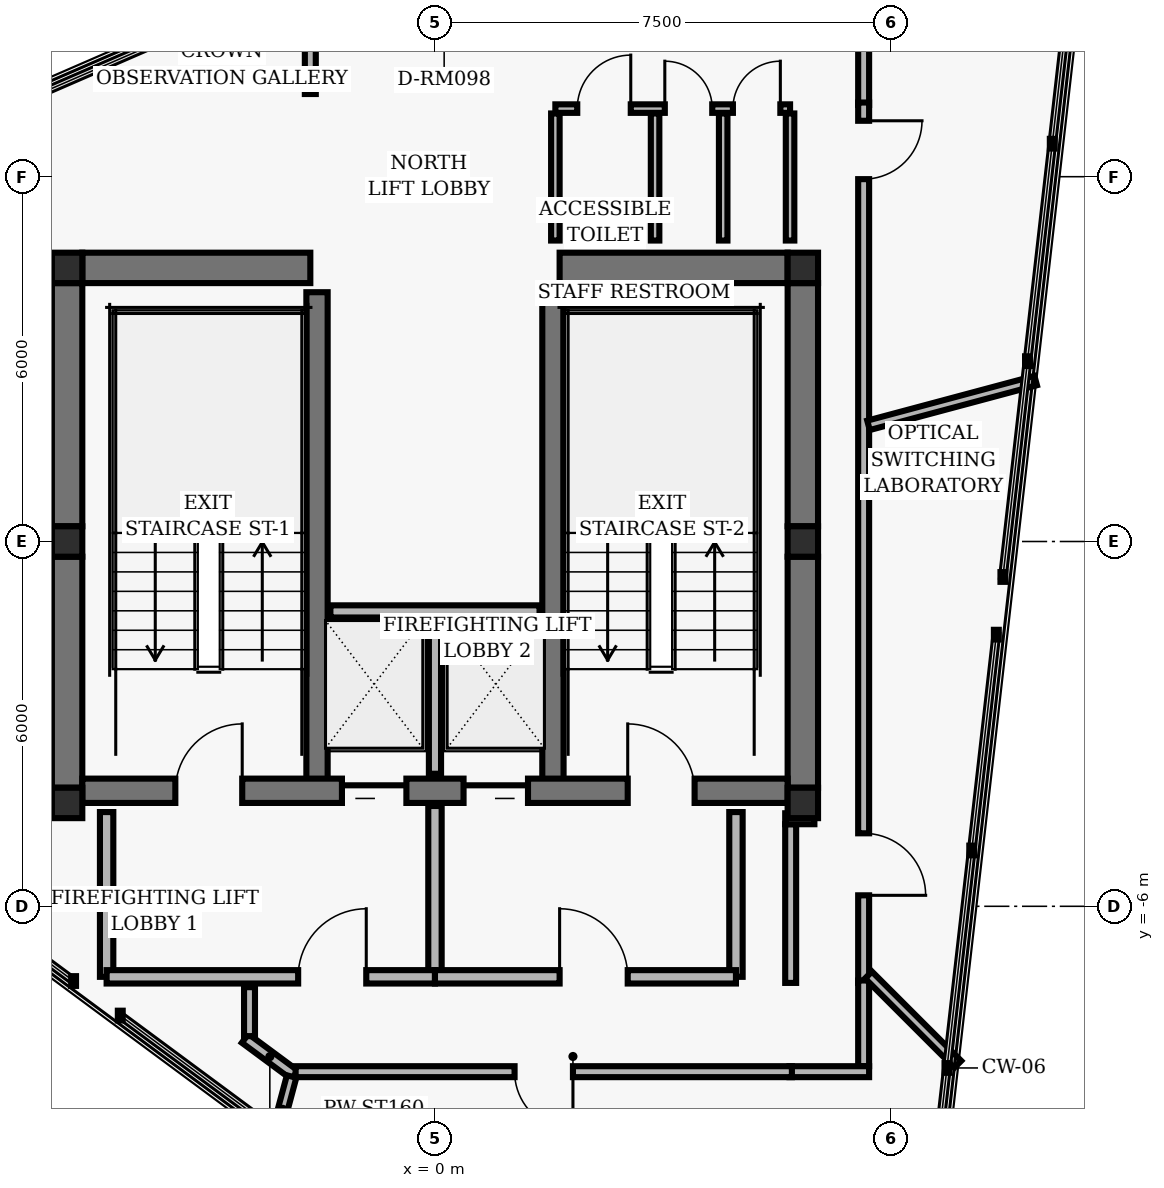
"""IFC4 building model, lengths in metres.
Left out: names, types, materials, properties, quantities, classifications, styles, units other than length and angle.
Written with IfcOpenShell. Run it as: python <this file> out.ifc"""

import sys

from ifc_helpers import new_model, si_unit, direction, frame, frame_2d, origin, origin_2d, place, context, subcontext, project, spatial, rectangle, hollow_rectangle, extrude, element, fill, save


model = new_model("IFC4")
c1 = context("Model", 3, precision=1e-05, world=origin(), true_north=direction((0.0, 1.0)))
c2 = subcontext(c1, "Body", "Model", "MODEL_VIEW")
j1 = project(units=[si_unit("LENGTHUNIT", "METRE"), si_unit("PLANEANGLEUNIT", "RADIAN")], contexts=[c1])
p1 = place(None, origin())
s1 = spatial("IfcSite", under=j1, at=p1, CompositionType="ELEMENT")
p2 = place(p1, origin())
s2 = spatial("IfcBuilding", under=s1, at=p2, CompositionType="ELEMENT")
p3 = place(p2, frame((0.0, 0.0, 246.24)))
s3 = spatial("IfcBuildingStorey", under=s2, at=p3, CompositionType="ELEMENT", Elevation=246.24)
for number, where, z_axis, x_axis in (
    (1, (-6.05, 4.5, 0.0), (0.0, 0.0, 1.0), (1.0, 0.0, 0.0)),
    (2, (6.05, 4.5, 0.0), (0.0, 0.0, 1.0), (1.0, 0.0, 0.0)),
    (3, (-6.05, 0.0, 0.0), (0.0, 0.0, 1.0), (1.0, 0.0, 0.0)),
    (4, (6.05, 0.0, 0.0), (0.0, 0.0, 1.0), (1.0, 0.0, 0.0)),
    (5, (-6.05, -4.3, 0.0), (0.0, 0.0, 1.0), (1.0, 0.0, 0.0)),
    (6, (6.05, -4.3, 0.0), (0.0, 0.0, 1.0), (1.0, 0.0, 0.0)),
):
    element("IfcColumn", number, at=place(p3, frame(where, z_axis=z_axis, x_axis=x_axis)), inside=s3, PredefinedType="COLUMN", context=c2, shape_type="SweptSolid", body=[
        extrude(hollow_rectangle(XDim=0.5, YDim=0.5, WallThickness=0.02, InnerFilletRadius=0.02, OuterFilletRadius=0.04, at=origin_2d()), origin(), (0.0, 0.0, 1.0), 2.88),
    ])
p4 = place(p3, frame((-6.05, 0.25, 0.0), z_axis=(0.0, 0.0, 1.0), x_axis=(0.0, 1.0, 0.0)))
e7 = element("IfcWall", 7, at=p4, inside=s3, PredefinedType="SHEAR", context=c2, shape_type="SweptSolid", body=[
    extrude(rectangle(XDim=4.0, YDim=0.5, at=frame_2d((2.0, 0.0))), origin(), (0.0, 0.0, 1.0), 2.648),
])
p5 = place(p3, frame((-6.05, -4.05, 0.0), z_axis=(0.0, 0.0, 1.0), x_axis=(0.0, 1.0, 0.0)))
e8 = element("IfcWall", 8, at=p5, inside=s3, PredefinedType="SHEAR", context=c2, shape_type="SweptSolid", body=[
    extrude(rectangle(XDim=3.8, YDim=0.5, at=frame_2d((1.9, 0.0))), origin(), (0.0, 0.0, 1.0), 2.648),
])
p6 = place(p3, frame((6.05, 0.25, 0.0), z_axis=(0.0, 0.0, 1.0), x_axis=(0.0, 1.0, 0.0)))
e9 = element("IfcWall", 9, at=p6, inside=s3, PredefinedType="SHEAR", context=c2, shape_type="SweptSolid", body=[
    extrude(rectangle(XDim=4.0, YDim=0.5, at=frame_2d((2.0, 0.0))), origin(), (0.0, 0.0, 1.0), 2.648),
])
p7 = place(p3, frame((6.05, -4.05, 0.0), z_axis=(0.0, 0.0, 1.0), x_axis=(0.0, 1.0, 0.0)))
e10 = element("IfcWall", 10, at=p7, inside=s3, PredefinedType="SHEAR", context=c2, shape_type="SweptSolid", body=[
    extrude(rectangle(XDim=3.8, YDim=0.5, at=frame_2d((1.9, 0.0))), origin(), (0.0, 0.0, 1.0), 2.648),
])
for number, where, z_axis, x_axis in (
    (11, (-1.94, -4.1, 0.0), (0.0, 0.0, 1.0), (0.0, 1.0, 0.0)),
    (12, (1.94, -4.1, 0.0), (0.0, 0.0, 1.0), (0.0, 1.0, 0.0)),
):
    element("IfcWall", number, at=place(p3, frame(where, z_axis=z_axis, x_axis=x_axis)), inside=s3, PredefinedType="SHEAR", context=c2, shape_type="SweptSolid", body=[
        extrude(rectangle(XDim=8.2, YDim=0.35, at=frame_2d((4.1, 0.0))), origin(), (0.0, 0.0, 1.0), 2.648),
    ])
p8 = place(p3, frame((-5.8, -4.1, 0.0), z_axis=(0.0, 0.0, 1.0), x_axis=(1.0, 0.0, 0.0)))
e13 = element("IfcWall", 13, at=p8, inside=s3, PredefinedType="SHEAR", context=c2, shape_type="SweptSolid", body=[
    extrude(rectangle(XDim=11.6, YDim=0.4, at=frame_2d((5.8, 0.0))), origin(), (0.0, 0.0, 1.0), 2.648),
])
p9 = place(p8, frame((1.53, 0.0, 0.0)))
e14 = element("IfcOpeningElement", 14, at=p9, cuts=e13, PredefinedType="OPENING", context=c2, shape_type="SweptSolid", body=[
    extrude(rectangle(XDim=1.1, YDim=2.04, at=frame_2d((0.55, 1.02))), frame((0.0, 0.21, 0.0), z_axis=(0.0, -1.0, 0.0), x_axis=(1.0, 0.0, 0.0)), (0.0, 0.0, 1.0), 0.42),
])
p10 = place(p8, frame((8.97, 0.0, 0.0)))
e15 = element("IfcOpeningElement", 15, at=p10, cuts=e13, PredefinedType="OPENING", context=c2, shape_type="SweptSolid", body=[
    extrude(rectangle(XDim=1.1, YDim=2.04, at=frame_2d((0.55, 1.02))), frame((0.0, 0.21, 0.0), z_axis=(0.0, -1.0, 0.0), x_axis=(1.0, 0.0, 0.0)), (0.0, 0.0, 1.0), 0.42),
])
p11 = place(p8, frame((4.27, 0.0, 0.0)))
e16 = element("IfcOpeningElement", 16, at=p11, cuts=e13, PredefinedType="OPENING", context=c2, shape_type="SweptSolid", body=[
    extrude(rectangle(XDim=1.06, YDim=2.04, at=frame_2d((0.53, 1.02))), frame((0.0, 0.21, 0.0), z_axis=(0.0, -1.0, 0.0), x_axis=(1.0, 0.0, 0.0)), (0.0, 0.0, 1.0), 0.42),
])
p12 = place(p8, frame((6.27, 0.0, 0.0)))
e17 = element("IfcOpeningElement", 17, at=p12, cuts=e13, PredefinedType="OPENING", context=c2, shape_type="SweptSolid", body=[
    extrude(rectangle(XDim=1.06, YDim=2.04, at=frame_2d((0.53, 1.02))), frame((0.0, 0.21, 0.0), z_axis=(0.0, -1.0, 0.0), x_axis=(1.0, 0.0, 0.0)), (0.0, 0.0, 1.0), 0.42),
])
for number, where, z_axis, x_axis in (
    (18, (-5.8, 4.5, 0.0), (0.0, 0.0, 1.0), (1.0, 0.0, 0.0)),
    (19, (2.05, 4.5, 0.0), (0.0, 0.0, 1.0), (1.0, 0.0, 0.0)),
):
    element("IfcWall", number, at=place(p3, frame(where, z_axis=z_axis, x_axis=x_axis)), inside=s3, PredefinedType="SHEAR", context=c2, shape_type="SweptSolid", body=[
        extrude(rectangle(XDim=3.75, YDim=0.5, at=frame_2d((1.875, 0.0))), origin(), (0.0, 0.0, 1.0), 2.648),
    ])
p13 = place(p3, frame((0.0, -3.82, 0.0), z_axis=(0.0, 0.0, 1.0), x_axis=(0.0, 1.0, 0.0)))
e20 = element("IfcWall", 20, at=p13, inside=s3, PredefinedType="PARTITIONING", context=c2, shape_type="SweptSolid", body=[
    extrude(rectangle(XDim=2.67, YDim=0.2, at=frame_2d((1.335, 0.0))), origin(), (0.0, 0.0, 1.0), 2.623),
])
p14 = place(p3, frame((-1.72, -1.15, 0.0), z_axis=(0.0, 0.0, 1.0), x_axis=(1.0, 0.0, 0.0)))
e21 = element("IfcWall", 21, at=p14, inside=s3, PredefinedType="PARTITIONING", context=c2, shape_type="SweptSolid", body=[
    extrude(rectangle(XDim=3.44, YDim=0.2, at=frame_2d((1.72, 0.0))), origin(), (0.0, 0.0, 1.0), 2.623),
])
for number, where, z_axis, x_axis in (
    (22, (-5.4, -7.16, 0.0), (0.0, 0.0, 1.0), (0.0, 1.0, 0.0)),
    (23, (4.95, -7.16, 0.0), (0.0, 0.0, 1.0), (0.0, 1.0, 0.0)),
):
    element("IfcWall", number, at=place(p3, frame(where, z_axis=z_axis, x_axis=x_axis)), inside=s3, PredefinedType="PARTITIONING", context=c2, shape_type="SweptSolid", body=[
        extrude(rectangle(XDim=2.71, YDim=0.22, at=frame_2d((1.355, 0.0))), origin(), (0.0, 0.0, 1.0), 2.623),
    ])
p15 = place(p3, frame((0.0, -7.16, 0.0), z_axis=(0.0, 0.0, 1.0), x_axis=(0.0, 1.0, 0.0)))
e24 = element("IfcWall", 24, at=p15, inside=s3, PredefinedType="PARTITIONING", context=c2, shape_type="SweptSolid", body=[
    extrude(rectangle(XDim=2.81, YDim=0.22, at=frame_2d((1.405, 0.0))), origin(), (0.0, 0.0, 1.0), 2.623),
])
p16 = place(p3, frame((-5.4, -7.16, 0.0), z_axis=(0.0, 0.0, 1.0), x_axis=(1.0, 0.0, 0.0)))
e25 = element("IfcWall", 25, at=p16, inside=s3, PredefinedType="PARTITIONING", context=c2, shape_type="SweptSolid", body=[
    extrude(rectangle(XDim=5.4, YDim=0.22, at=frame_2d((2.7, 0.0))), origin(), (0.0, 0.0, 1.0), 2.623),
])
p17 = place(p16, frame((3.15, 0.0, 0.0)))
e26 = element("IfcOpeningElement", 26, at=p17, cuts=e25, PredefinedType="OPENING", context=c2, shape_type="SweptSolid", body=[
    extrude(rectangle(XDim=1.12, YDim=2.02, at=frame_2d((0.56, 1.01))), frame((0.0, 0.12, 0.0), z_axis=(0.0, -1.0, 0.0), x_axis=(1.0, 0.0, 0.0)), (0.0, 0.0, 1.0), 0.24),
])
p18 = place(p3, frame((0.0, -7.16, 0.0), z_axis=(0.0, 0.0, 1.0), x_axis=(1.0, 0.0, 0.0)))
e27 = element("IfcWall", 27, at=p18, inside=s3, PredefinedType="PARTITIONING", context=c2, shape_type="SweptSolid", body=[
    extrude(rectangle(XDim=4.95, YDim=0.22, at=frame_2d((2.475, 0.0))), origin(), (0.0, 0.0, 1.0), 2.623),
])
p19 = place(p18, frame((2.05, 0.0, 0.0)))
e28 = element("IfcOpeningElement", 28, at=p19, cuts=e27, PredefinedType="OPENING", context=c2, shape_type="SweptSolid", body=[
    extrude(rectangle(XDim=1.12, YDim=2.02, at=frame_2d((0.56, 1.01))), frame((0.0, 0.12, 0.0), z_axis=(0.0, -1.0, 0.0), x_axis=(1.0, 0.0, 0.0)), (0.0, 0.0, 1.0), 0.24),
])
p20 = place(p3, frame((1.98, 4.95, 0.0), z_axis=(0.0, 0.0, 1.0), x_axis=(0.0, 1.0, 0.0)))
e29 = element("IfcWall", 29, at=p20, inside=s3, PredefinedType="PARTITIONING", context=c2, shape_type="SweptSolid", body=[
    extrude(rectangle(XDim=2.09, YDim=0.14, at=frame_2d((1.045, 0.0))), origin(), (0.0, 0.0, 1.0), 2.623),
])
p21 = place(p3, frame((5.84, 4.95, 0.0), z_axis=(0.0, 0.0, 1.0), x_axis=(0.0, 1.0, 0.0)))
e30 = element("IfcWall", 30, at=p21, inside=s3, PredefinedType="PARTITIONING", context=c2, shape_type="SweptSolid", body=[
    extrude(rectangle(XDim=2.09, YDim=0.14, at=frame_2d((1.045, 0.0))), origin(), (0.0, 0.0, 1.0), 2.153),
])
p22 = place(p3, frame((1.98, 7.12, 0.0), z_axis=(0.0, 0.0, 1.0), x_axis=(1.0, 0.0, 0.0)))
e31 = element("IfcWall", 31, at=p22, inside=s3, PredefinedType="PARTITIONING", context=c2, shape_type="SweptSolid", body=[
    extrude(rectangle(XDim=3.86, YDim=0.14, at=frame_2d((1.93, 0.0))), origin(), (0.0, 0.0, 1.0), 2.623),
])
p23 = place(p22, frame((0.36, 0.0, 0.0)))
e32 = element("IfcOpeningElement", 32, at=p23, cuts=e31, PredefinedType="OPENING", context=c2, shape_type="SweptSolid", body=[
    extrude(rectangle(XDim=0.88, YDim=2.02, at=frame_2d((0.44, 1.01))), frame((0.0, 0.08, 0.0), z_axis=(0.0, -1.0, 0.0), x_axis=(1.0, 0.0, 0.0)), (0.0, 0.0, 1.0), 0.16),
])
p24 = place(p22, frame((1.8, 0.0, 0.0)))
e33 = element("IfcOpeningElement", 33, at=p24, cuts=e31, PredefinedType="OPENING", context=c2, shape_type="SweptSolid", body=[
    extrude(rectangle(XDim=0.78, YDim=2.01, at=frame_2d((0.39, 1.005))), frame((0.0, 0.08, 0.0), z_axis=(0.0, -1.0, 0.0), x_axis=(1.0, 0.0, 0.0)), (0.0, 0.0, 1.0), 0.16),
])
p25 = place(p22, frame((2.92, 0.0, 0.0)))
e34 = element("IfcOpeningElement", 34, at=p25, cuts=e31, PredefinedType="OPENING", context=c2, shape_type="SweptSolid", body=[
    extrude(rectangle(XDim=0.78, YDim=2.01, at=frame_2d((0.39, 1.005))), frame((0.0, 0.08, 0.0), z_axis=(0.0, -1.0, 0.0), x_axis=(1.0, 0.0, 0.0)), (0.0, 0.0, 1.0), 0.16),
])
for number, where, z_axis, x_axis in (
    (35, (3.62, 4.95, 0.0), (0.0, 0.0, 1.0), (0.0, 1.0, 0.0)),
    (36, (4.74, 4.95, 0.0), (0.0, 0.0, 1.0), (0.0, 1.0, 0.0)),
):
    element("IfcWall", number, at=place(p3, frame(where, z_axis=z_axis, x_axis=x_axis)), inside=s3, PredefinedType="PARTITIONING", context=c2, shape_type="SweptSolid", body=[
        extrude(rectangle(XDim=2.09, YDim=0.14, at=frame_2d((1.045, 0.0))), origin(), (0.0, 0.0, 1.0), 2.623),
    ])
p26 = place(p3, frame((-2.309, -8.773, 0.0), z_axis=(0.0, 0.0, 1.0), x_axis=(-0.803864984235, 0.594811808155, 0.0)))
e37 = element("IfcWall", 37, at=p26, inside=s3, PredefinedType="PARTITIONING", context=c2, shape_type="SweptSolid", body=[
    extrude(rectangle(XDim=1.011, YDim=0.18, at=frame_2d((0.506, 0.0))), origin(), (0.0, 0.0, 1.0), 2.203),
])
p27 = place(p3, frame((-3.05, -8.135, 0.0), z_axis=(0.0, 0.0, 1.0), x_axis=(0.0, 1.0, 0.0)))
e38 = element("IfcWall", 38, at=p27, inside=s3, PredefinedType="PARTITIONING", context=c2, shape_type="SweptSolid", body=[
    extrude(rectangle(XDim=0.805, YDim=0.18, at=frame_2d((0.403, 0.0))), origin(), (0.0, 0.0, 1.0), 2.623),
])
p28 = place(p3, frame((5.85, -7.26, 0.0), z_axis=(0.0, 0.0, 1.0), x_axis=(0.0, 1.0, 0.0)))
e39 = element("IfcWall", 39, at=p28, inside=s3, PredefinedType="PARTITIONING", context=c2, shape_type="SweptSolid", body=[
    extrude(rectangle(XDim=2.61, YDim=0.18, at=frame_2d((1.305, 0.0))), origin(), (0.0, 0.0, 1.0), 2.153),
])
p29 = place(p3, frame((5.76, -4.56, 0.0), z_axis=(0.0, 0.0, 1.0), x_axis=(1.0, 0.0, 0.0)))
e40 = element("IfcWall", 40, at=p29, inside=s3, PredefinedType="PARTITIONING", context=c2, shape_type="SweptSolid", body=[
    extrude(rectangle(XDim=0.48, YDim=0.18, at=frame_2d((0.24, 0.0))), origin(), (0.0, 0.0, 1.0), 2.623),
])
p30 = place(p3, frame((-2.05, 7.36, 0.0), z_axis=(0.0, 0.0, 1.0), x_axis=(0.0, 1.0, 0.0)))
e41 = element("IfcWall", 41, at=p30, inside=s3, PredefinedType="PARTITIONING", context=c2, shape_type="SweptSolid", body=[
    extrude(rectangle(XDim=0.847, YDim=0.18, at=frame_2d((0.423, 0.0))), origin(), (0.0, 0.0, 1.0), 2.623),
])
p31 = place(p3, frame((7.05, 8.53, 0.0), z_axis=(0.0, 0.0, 1.0), x_axis=(0.0, -1.0, 0.0)))
e42 = element("IfcWall", 42, at=p31, inside=s3, PredefinedType="PARTITIONING", context=c2, shape_type="SweptSolid", body=[
    extrude(rectangle(XDim=1.35, YDim=0.18, at=frame_2d((0.675, 0.0))), origin(), (0.0, 0.0, 1.0), 2.623),
])
p32 = place(p3, frame((7.05, 7.22, 0.0), z_axis=(0.0, 0.0, 1.0), x_axis=(0.0, -1.0, 0.0)))
e43 = element("IfcWall", 43, at=p32, inside=s3, PredefinedType="PARTITIONING", context=c2, shape_type="SweptSolid", body=[
    extrude(rectangle(XDim=14.48, YDim=0.18, at=frame_2d((7.24, 0.0))), origin(), (0.0, 0.0, 1.0), 2.203),
])
p33 = place(p32, frame((12.019, 0.0, 0.0)))
e44 = element("IfcOpeningElement", 44, at=p33, cuts=e43, PredefinedType="OPENING", context=c2, shape_type="SweptSolid", body=[
    extrude(rectangle(XDim=1.02, YDim=2.02, at=frame_2d((0.51, 1.01))), frame((0.0, 0.1, 0.0), z_axis=(0.0, -1.0, 0.0), x_axis=(1.0, 0.0, 0.0)), (0.0, 0.0, 1.0), 0.2),
])
p34 = place(p32, frame((0.3, 0.0, 0.0)))
e45 = element("IfcOpeningElement", 45, at=p34, cuts=e43, PredefinedType="OPENING", context=c2, shape_type="SweptSolid", body=[
    extrude(rectangle(XDim=0.96, YDim=2.02, at=frame_2d((0.48, 1.01))), frame((0.0, 0.1, 0.0), z_axis=(0.0, -1.0, 0.0), x_axis=(1.0, 0.0, 0.0)), (0.0, 0.0, 1.0), 0.2),
])
p35 = place(p3, frame((7.05, -7.22, 0.0), z_axis=(0.0, 0.0, 1.0), x_axis=(0.0, -1.0, 0.0)))
e46 = element("IfcWall", 46, at=p35, inside=s3, PredefinedType="PARTITIONING", context=c2, shape_type="SweptSolid", body=[
    extrude(rectangle(XDim=1.41, YDim=0.18, at=frame_2d((0.705, 0.0))), origin(), (0.0, 0.0, 1.0), 2.153),
])
p36 = place(p3, frame((7.14, -8.72, 0.0), z_axis=(0.0, 0.0, 1.0), x_axis=(-1.0, 0.0, 0.0)))
e47 = element("IfcWall", 47, at=p36, inside=s3, PredefinedType="PARTITIONING", context=c2, shape_type="SweptSolid", body=[
    extrude(rectangle(XDim=1.31, YDim=0.18, at=frame_2d((0.655, 0.0))), origin(), (0.0, 0.0, 1.0), 2.623),
])
p37 = place(p3, frame((5.87, -8.72, 0.0), z_axis=(0.0, 0.0, 1.0), x_axis=(-1.0, 0.0, 0.0)))
e48 = element("IfcWall", 48, at=p37, inside=s3, PredefinedType="PARTITIONING", context=c2, shape_type="SweptSolid", body=[
    extrude(rectangle(XDim=8.162, YDim=0.18, at=frame_2d((4.081, 0.0))), origin(), (0.0, 0.0, 1.0), 2.623),
])
p38 = place(p37, frame((3.601, 0.0, 0.0)))
e49 = element("IfcOpeningElement", 49, at=p38, cuts=e48, PredefinedType="OPENING", context=c2, shape_type="SweptSolid", body=[
    extrude(rectangle(XDim=0.96, YDim=2.02, at=frame_2d((0.48, 1.01))), frame((0.0, 0.1, 0.0), z_axis=(0.0, -1.0, 0.0), x_axis=(1.0, 0.0, 0.0)), (0.0, 0.0, 1.0), 0.2),
])
p39 = place(p3, frame((-2.358, -8.8, 0.0), z_axis=(0.0, 0.0, 1.0), x_axis=(-0.258899893442, -0.965904159415, 0.0)))
e50 = element("IfcWall", 50, at=p39, inside=s3, PredefinedType="PARTITIONING", context=c2, shape_type="SweptSolid", body=[
    extrude(rectangle(XDim=1.117, YDim=0.16, at=frame_2d((0.559, 0.0))), origin(), (0.0, 0.0, 1.0), 2.623),
])
p40 = place(p3, frame((7.13, -7.13, 0.0), z_axis=(0.0, 0.0, 1.0), x_axis=(0.707106781187, -0.707106781187, 0.0)))
e51 = element("IfcWall", 51, at=p40, inside=s3, PredefinedType="PARTITIONING", context=c2, shape_type="SweptSolid", body=[
    extrude(rectangle(XDim=2.076, YDim=0.16, at=frame_2d((1.038, 0.0))), origin(), (0.0, 0.0, 1.0), 2.623),
])
p41 = place(p3, frame((7.13, 1.91, 0.0), z_axis=(0.0, 0.0, 1.0), x_axis=(0.965918188347, 0.258847548609, 0.0)))
e52 = element("IfcWall", 52, at=p41, inside=s3, PredefinedType="PARTITIONING", context=c2, shape_type="SweptSolid", body=[
    extrude(rectangle(XDim=2.846, YDim=0.16, at=frame_2d((1.423, 0.0))), origin(), (0.0, 0.0, 1.0), 2.623),
])
p42 = place(p9, origin())
e53 = element("IfcDoor", 53, at=p42, inside=s3, OperationType="SINGLE_SWING_RIGHT", PredefinedType="DOOR", context=c2, shape_type="SweptSolid", body=[
    extrude(rectangle(XDim=1.1, YDim=2.04, at=frame_2d((0.55, 1.02))), frame((0.0, 0.025, 0.0), z_axis=(0.0, -1.0, 0.0), x_axis=(1.0, 0.0, 0.0)), (0.0, 0.0, 1.0), 0.05),
])
fill(e14, e53)
p43 = place(p10, origin())
e54 = element("IfcDoor", 54, at=p43, inside=s3, OperationType="SINGLE_SWING_LEFT", PredefinedType="DOOR", context=c2, shape_type="SweptSolid", body=[
    extrude(rectangle(XDim=1.1, YDim=2.04, at=frame_2d((0.55, 1.02))), frame((0.0, 0.025, 0.0), z_axis=(0.0, -1.0, 0.0), x_axis=(1.0, 0.0, 0.0)), (0.0, 0.0, 1.0), 0.05),
])
fill(e15, e54)
p44 = place(p11, origin())
e55 = element("IfcDoor", 55, at=p44, inside=s3, OperationType="SLIDING_TO_LEFT", PredefinedType="DOOR", context=c2, shape_type="SweptSolid", body=[
    extrude(rectangle(XDim=1.06, YDim=2.04, at=frame_2d((0.53, 1.02))), frame((0.0, 0.025, 0.0), z_axis=(0.0, -1.0, 0.0), x_axis=(1.0, 0.0, 0.0)), (0.0, 0.0, 1.0), 0.05),
])
fill(e16, e55)
p45 = place(p12, origin())
e56 = element("IfcDoor", 56, at=p45, inside=s3, OperationType="SLIDING_TO_RIGHT", PredefinedType="DOOR", context=c2, shape_type="SweptSolid", body=[
    extrude(rectangle(XDim=1.06, YDim=2.04, at=frame_2d((0.53, 1.02))), frame((0.0, 0.025, 0.0), z_axis=(0.0, -1.0, 0.0), x_axis=(1.0, 0.0, 0.0)), (0.0, 0.0, 1.0), 0.05),
])
fill(e17, e56)
p46 = place(p17, origin())
e57 = element("IfcDoor", 57, at=p46, inside=s3, OperationType="SINGLE_SWING_RIGHT", PredefinedType="DOOR", context=c2, shape_type="SweptSolid", body=[
    extrude(rectangle(XDim=1.12, YDim=2.02, at=frame_2d((0.56, 1.01))), frame((0.0, 0.025, 0.0), z_axis=(0.0, -1.0, 0.0), x_axis=(1.0, 0.0, 0.0)), (0.0, 0.0, 1.0), 0.05),
])
fill(e26, e57)
p47 = place(p19, origin())
e58 = element("IfcDoor", 58, at=p47, inside=s3, OperationType="SINGLE_SWING_LEFT", PredefinedType="DOOR", context=c2, shape_type="SweptSolid", body=[
    extrude(rectangle(XDim=1.12, YDim=2.02, at=frame_2d((0.56, 1.01))), frame((0.0, 0.025, 0.0), z_axis=(0.0, -1.0, 0.0), x_axis=(1.0, 0.0, 0.0)), (0.0, 0.0, 1.0), 0.05),
])
fill(e28, e58)
p48 = place(p23, origin())
e59 = element("IfcDoor", 59, at=p48, inside=s3, OperationType="SINGLE_SWING_RIGHT", PredefinedType="DOOR", context=c2, shape_type="SweptSolid", body=[
    extrude(rectangle(XDim=0.88, YDim=2.02, at=frame_2d((0.44, 1.01))), frame((0.0, 0.025, 0.0), z_axis=(0.0, -1.0, 0.0), x_axis=(1.0, 0.0, 0.0)), (0.0, 0.0, 1.0), 0.05),
])
fill(e32, e59)
p49 = place(p24, origin())
e60 = element("IfcDoor", 60, at=p49, inside=s3, OperationType="SINGLE_SWING_LEFT", PredefinedType="DOOR", context=c2, shape_type="SweptSolid", body=[
    extrude(rectangle(XDim=0.78, YDim=2.01, at=frame_2d((0.39, 1.005))), frame((0.0, 0.025, 0.0), z_axis=(0.0, -1.0, 0.0), x_axis=(1.0, 0.0, 0.0)), (0.0, 0.0, 1.0), 0.05),
])
fill(e33, e60)
p50 = place(p25, origin())
e61 = element("IfcDoor", 61, at=p50, inside=s3, OperationType="SINGLE_SWING_RIGHT", PredefinedType="DOOR", context=c2, shape_type="SweptSolid", body=[
    extrude(rectangle(XDim=0.78, YDim=2.01, at=frame_2d((0.39, 1.005))), frame((0.0, 0.025, 0.0), z_axis=(0.0, -1.0, 0.0), x_axis=(1.0, 0.0, 0.0)), (0.0, 0.0, 1.0), 0.05),
])
fill(e34, e61)
p51 = place(p38, origin())
e62 = element("IfcDoor", 62, at=p51, inside=s3, OperationType="SINGLE_SWING_LEFT", PredefinedType="DOOR", context=c2, shape_type="SweptSolid", body=[
    extrude(rectangle(XDim=0.96, YDim=2.02, at=frame_2d((0.48, 1.01))), frame((0.0, 0.025, 0.0), z_axis=(0.0, -1.0, 0.0), x_axis=(1.0, 0.0, 0.0)), (0.0, 0.0, 1.0), 0.05),
])
fill(e49, e62)
p52 = place(p33, origin())
e63 = element("IfcDoor", 63, at=p52, inside=s3, OperationType="SINGLE_SWING_RIGHT", PredefinedType="DOOR", context=c2, shape_type="SweptSolid", body=[
    extrude(rectangle(XDim=1.02, YDim=2.02, at=frame_2d((0.51, 1.01))), frame((0.0, 0.025, 0.0), z_axis=(0.0, -1.0, 0.0), x_axis=(1.0, 0.0, 0.0)), (0.0, 0.0, 1.0), 0.05),
])
fill(e44, e63)
p53 = place(p34, origin())
e64 = element("IfcDoor", 64, at=p53, inside=s3, OperationType="SINGLE_SWING_LEFT", PredefinedType="DOOR", context=c2, shape_type="SweptSolid", body=[
    extrude(rectangle(XDim=0.96, YDim=2.02, at=frame_2d((0.48, 1.01))), frame((0.0, 0.025, 0.0), z_axis=(0.0, -1.0, 0.0), x_axis=(1.0, 0.0, 0.0)), (0.0, 0.0, 1.0), 0.05),
])
fill(e45, e64)
save(model, sys.argv[1])
